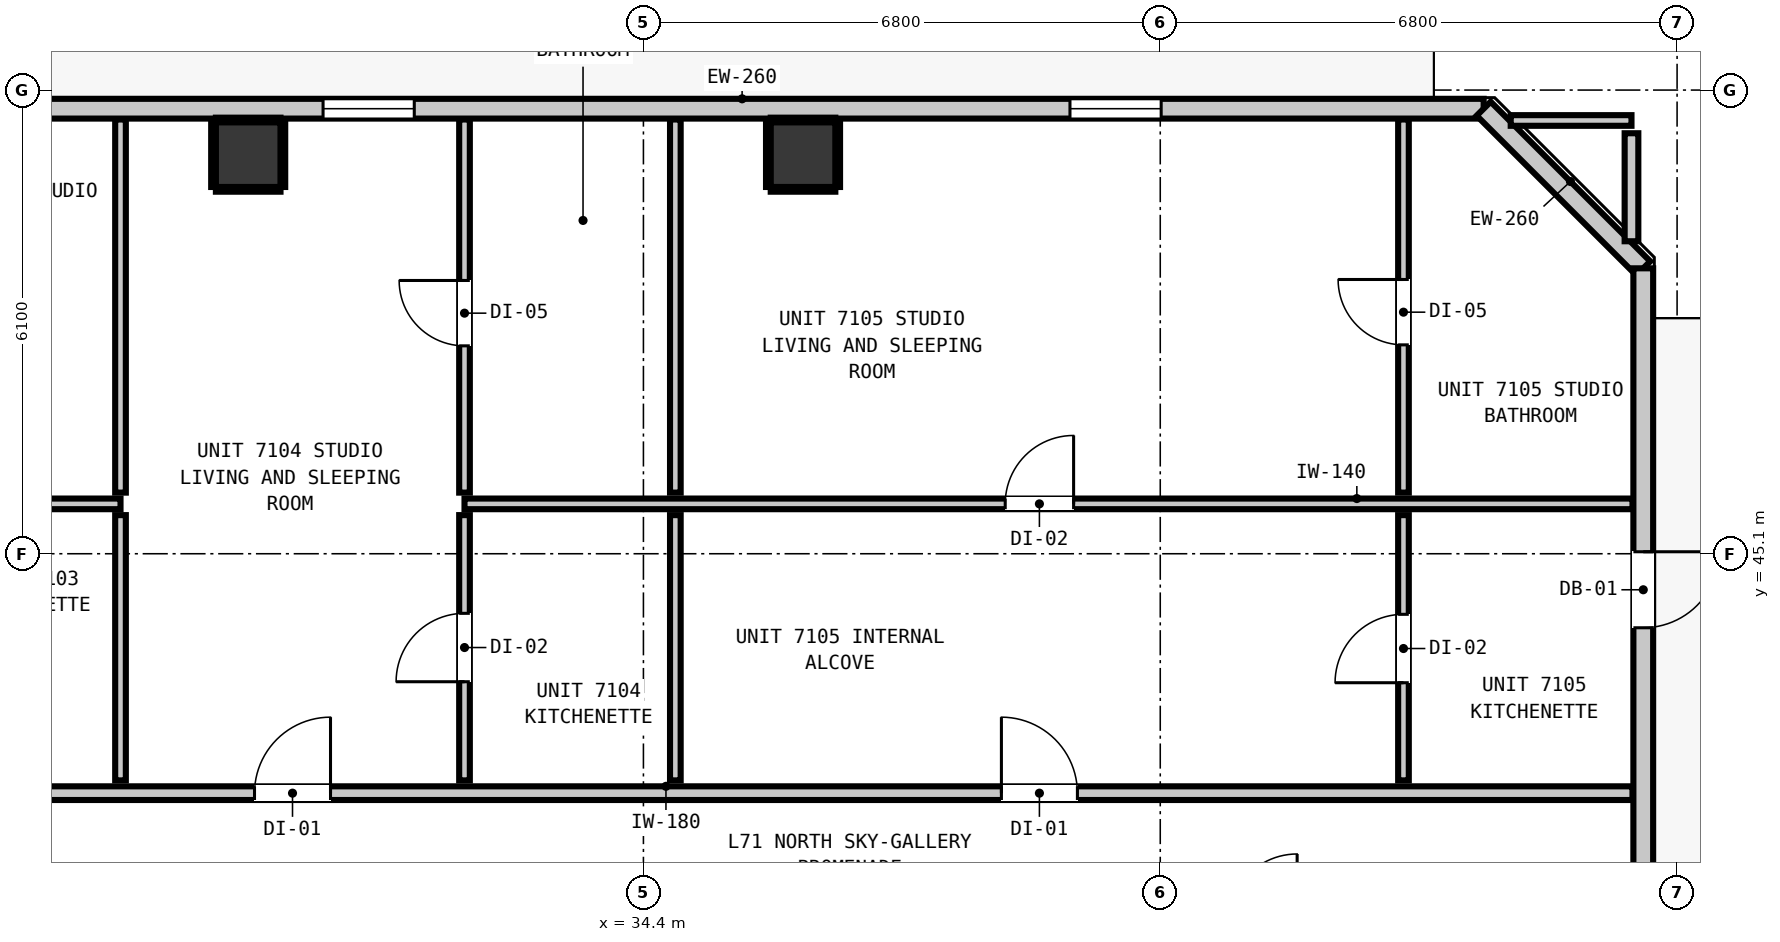
"""IFC4 building model, lengths in metres.
Left out: names, types, materials, properties, quantities, classifications, styles, units other than length and angle.
Written with IfcOpenShell. Run it as: python <this file> out.ifc"""

import sys

from ifc_helpers import new_model, si_unit, direction, frame, frame_2d, origin, origin_2d, place, context, subcontext, project, spatial, rectangle, extrude, element, fill, save


model = new_model("IFC4")
c1 = context("Model", 3, precision=1e-05, world=origin(), true_north=direction((0.0, 1.0)))
c2 = subcontext(c1, "Body", "Model", "MODEL_VIEW")
j1 = project(units=[si_unit("LENGTHUNIT", "METRE"), si_unit("PLANEANGLEUNIT", "RADIAN")], contexts=[c1])
p1 = place(None, origin())
s1 = spatial("IfcSite", under=j1, at=p1, CompositionType="ELEMENT")
p2 = place(p1, origin())
s2 = spatial("IfcBuilding", under=s1, at=p2, CompositionType="ELEMENT")
p3 = place(p2, frame((0.0, 0.0, 244.56)))
s3 = spatial("IfcBuildingStorey", under=s2, at=p3, CompositionType="ELEMENT", Elevation=244.56)
for number, where, z_axis, x_axis in (
    (1, (29.2, 50.35, 0.0), (0.0, 0.0, 1.0), (1.0, 0.0, 0.0)),
    (2, (36.5, 50.35, 0.0), (0.0, 0.0, 1.0), (1.0, 0.0, 0.0)),
):
    element("IfcColumn", number, at=place(p3, frame(where, z_axis=z_axis, x_axis=x_axis)), inside=s3, PredefinedType="COLUMN", context=c2, shape_type="SweptSolid", body=[
        extrude(rectangle(XDim=0.85, YDim=0.85, at=origin_2d()), origin(), (0.0, 0.0, 1.0), 3.32),
    ])
p4 = place(p3, frame((12.745, 50.955, 0.0), z_axis=(0.0, 0.0, 1.0), x_axis=(1.0, 0.0, 0.0)))
e3 = element("IfcWall", 3, at=p4, inside=s3, PredefinedType="STANDARD", context=c2, shape_type="SweptSolid", body=[
    extrude(rectangle(XDim=32.71, YDim=0.26, at=frame_2d((16.355, 0.0))), origin(), (0.0, 0.0, 1.0), 3.1),
])
p5 = place(p4, frame((1.61, 0.0, 0.0)))
e4 = element("IfcOpeningElement", 4, at=p5, cuts=e3, PredefinedType="OPENING", context=c2, shape_type="SweptSolid", body=[
    extrude(rectangle(XDim=1.0, YDim=2.15, at=frame_2d((0.5, 1.075))), frame((0.0, 0.14, 0.0), z_axis=(0.0, -1.0, 0.0), x_axis=(1.0, 0.0, 0.0)), (0.0, 0.0, 1.0), 0.28),
])
p6 = place(p4, frame((9.478, 0.0, 0.85)))
e5 = element("IfcOpeningElement", 5, at=p6, cuts=e3, PredefinedType="OPENING", context=c2, shape_type="SweptSolid", body=[
    extrude(rectangle(XDim=1.2, YDim=1.8, at=frame_2d((0.6, 0.9))), frame((0.0, 0.14, 0.0), z_axis=(0.0, -1.0, 0.0), x_axis=(1.0, 0.0, 0.0)), (0.0, 0.0, 1.0), 0.28),
])
p7 = place(p4, frame((17.44, 0.0, 0.85)))
e6 = element("IfcOpeningElement", 6, at=p7, cuts=e3, PredefinedType="OPENING", context=c2, shape_type="SweptSolid", body=[
    extrude(rectangle(XDim=1.2, YDim=1.8, at=frame_2d((0.6, 0.9))), frame((0.0, 0.14, 0.0), z_axis=(0.0, -1.0, 0.0), x_axis=(1.0, 0.0, 0.0)), (0.0, 0.0, 1.0), 0.28),
])
p8 = place(p4, frame((27.267, 0.0, 0.85)))
e7 = element("IfcOpeningElement", 7, at=p8, cuts=e3, PredefinedType="OPENING", context=c2, shape_type="SweptSolid", body=[
    extrude(rectangle(XDim=1.2, YDim=1.8, at=frame_2d((0.6, 0.9))), frame((0.0, 0.14, 0.0), z_axis=(0.0, -1.0, 0.0), x_axis=(1.0, 0.0, 0.0)), (0.0, 0.0, 1.0), 0.28),
])
p9 = place(p3, frame((45.455, 50.955, 0.0), z_axis=(0.0, 0.0, 1.0), x_axis=(0.707065676302, -0.707147883682, 0.0)))
e8 = element("IfcWall", 8, at=p9, inside=s3, PredefinedType="STANDARD", context=c2, shape_type="SweptSolid", body=[
    extrude(rectangle(XDim=2.97, YDim=0.26, at=frame_2d((1.485, 0.0))), origin(), (0.0, 0.0, 1.0), 3.1),
])
p10 = place(p3, frame((47.555, 48.855, 0.0), z_axis=(0.0, 0.0, 1.0), x_axis=(0.0, -1.0, 0.0)))
e9 = element("IfcWall", 9, at=p10, inside=s3, PredefinedType="STANDARD", context=c2, shape_type="SweptSolid", body=[
    extrude(rectangle(XDim=30.31, YDim=0.26, at=frame_2d((15.155, 0.0))), origin(), (0.0, 0.0, 1.0), 3.1),
])
p11 = place(p10, frame((3.729, 0.0, 0.0)))
e10 = element("IfcOpeningElement", 10, at=p11, cuts=e9, PredefinedType="OPENING", context=c2, shape_type="SweptSolid", body=[
    extrude(rectangle(XDim=1.0, YDim=2.15, at=frame_2d((0.5, 1.075))), frame((0.0, 0.14, 0.0), z_axis=(0.0, -1.0, 0.0), x_axis=(1.0, 0.0, 0.0)), (0.0, 0.0, 1.0), 0.28),
])
p12 = place(p3, frame((10.787, 41.95, 0.0), z_axis=(0.0, 0.0, 1.0), x_axis=(1.0, 0.0, 0.0)))
e11 = element("IfcWall", 11, at=p12, inside=s3, PredefinedType="PARTITIONING", context=c2, shape_type="SweptSolid", body=[
    extrude(rectangle(XDim=36.626, YDim=0.18, at=frame_2d((18.313, 0.0))), origin(), (0.0, 0.0, 1.0), 3.1),
])
p13 = place(p12, frame((2.197, 0.0, 0.0)))
e12 = element("IfcOpeningElement", 12, at=p13, cuts=e11, PredefinedType="OPENING", context=c2, shape_type="SweptSolid", body=[
    extrude(rectangle(XDim=1.0, YDim=2.15, at=frame_2d((0.5, 1.075))), frame((0.0, 0.1, 0.0), z_axis=(0.0, -1.0, 0.0), x_axis=(1.0, 0.0, 0.0)), (0.0, 0.0, 1.0), 0.2),
])
p14 = place(p12, frame((10.533, 0.0, 0.0)))
e13 = element("IfcOpeningElement", 13, at=p14, cuts=e11, PredefinedType="OPENING", context=c2, shape_type="SweptSolid", body=[
    extrude(rectangle(XDim=1.0, YDim=2.15, at=frame_2d((0.5, 1.075))), frame((0.0, 0.1, 0.0), z_axis=(0.0, -1.0, 0.0), x_axis=(1.0, 0.0, 0.0)), (0.0, 0.0, 1.0), 0.2),
])
p15 = place(p12, frame((18.496, 0.0, 0.0)))
e14 = element("IfcOpeningElement", 14, at=p15, cuts=e11, PredefinedType="OPENING", context=c2, shape_type="SweptSolid", body=[
    extrude(rectangle(XDim=1.0, YDim=2.15, at=frame_2d((0.5, 1.075))), frame((0.0, 0.1, 0.0), z_axis=(0.0, -1.0, 0.0), x_axis=(1.0, 0.0, 0.0)), (0.0, 0.0, 1.0), 0.2),
])
p16 = place(p12, frame((28.323, 0.0, 0.0)))
e15 = element("IfcOpeningElement", 15, at=p16, cuts=e11, PredefinedType="OPENING", context=c2, shape_type="SweptSolid", body=[
    extrude(rectangle(XDim=1.0, YDim=2.15, at=frame_2d((0.5, 1.075))), frame((0.0, 0.1, 0.0), z_axis=(0.0, -1.0, 0.0), x_axis=(1.0, 0.0, 0.0)), (0.0, 0.0, 1.0), 0.2),
])
p17 = place(p3, frame((24.52, 45.756, 0.0), z_axis=(0.0, 0.0, 1.0), x_axis=(1.0, 0.0, 0.0)))
e16 = element("IfcWall", 16, at=p17, inside=s3, PredefinedType="PARTITIONING", context=c2, shape_type="SweptSolid", body=[
    extrude(rectangle(XDim=3.0, YDim=0.14, at=frame_2d((1.5, 0.0))), origin(), (0.0, 0.0, 1.0), 3.1),
])
p18 = place(p3, frame((32.046, 45.756, 0.0), z_axis=(0.0, 0.0, 1.0), x_axis=(1.0, 0.0, 0.0)))
e17 = element("IfcWall", 17, at=p18, inside=s3, PredefinedType="PARTITIONING", context=c2, shape_type="SweptSolid", body=[
    extrude(rectangle(XDim=15.367, YDim=0.14, at=frame_2d((7.684, 0.0))), origin(), (0.0, 0.0, 1.0), 3.1),
])
p19 = place(p18, frame((7.114, 0.0, 0.0)))
e18 = element("IfcOpeningElement", 18, at=p19, cuts=e17, PredefinedType="OPENING", context=c2, shape_type="SweptSolid", body=[
    extrude(rectangle(XDim=0.9, YDim=2.1, at=frame_2d((0.45, 1.05))), frame((0.0, 0.08, 0.0), z_axis=(0.0, -1.0, 0.0), x_axis=(1.0, 0.0, 0.0)), (0.0, 0.0, 1.0), 0.16),
])
p20 = place(p3, frame((45.811, 50.8, 0.0), z_axis=(0.0, 0.0, 1.0), x_axis=(1.0, 0.0, 0.0)))
e19 = element("IfcWall", 19, at=p20, inside=s3, PredefinedType="PARTITIONING", context=c2, shape_type="SweptSolid", body=[
    extrude(rectangle(XDim=1.589, YDim=0.14, at=frame_2d((0.794, 0.0))), origin(), (0.0, 0.0, 1.0), 3.1),
])
p21 = place(p3, frame((47.4, 49.211, 0.0), z_axis=(0.0, 0.0, 1.0), x_axis=(0.0, 1.0, 0.0)))
e20 = element("IfcWall", 20, at=p21, inside=s3, PredefinedType="PARTITIONING", context=c2, shape_type="SweptSolid", body=[
    extrude(rectangle(XDim=1.421, YDim=0.18, at=frame_2d((0.71, 0.0))), origin(), (0.0, 0.0, 1.0), 3.1),
])
p22 = place(p3, frame((27.52, 42.118, 0.0), z_axis=(0.0, 0.0, 1.0), x_axis=(0.0, 1.0, 0.0)))
e21 = element("IfcWall", 21, at=p22, inside=s3, PredefinedType="PARTITIONING", context=c2, shape_type="SweptSolid", body=[
    extrude(rectangle(XDim=3.49, YDim=0.14, at=frame_2d((1.745, 0.0))), origin(), (0.0, 0.0, 1.0), 3.1),
])
p23 = place(p3, frame((27.52, 45.904, 0.0), z_axis=(0.0, 0.0, 1.0), x_axis=(0.0, 1.0, 0.0)))
e22 = element("IfcWall", 22, at=p23, inside=s3, PredefinedType="PARTITIONING", context=c2, shape_type="SweptSolid", body=[
    extrude(rectangle(XDim=4.909, YDim=0.14, at=frame_2d((2.455, 0.0))), origin(), (0.0, 0.0, 1.0), 3.1),
])
p24 = place(p3, frame((32.046, 42.118, 0.0), z_axis=(0.0, 0.0, 1.0), x_axis=(0.0, 1.0, 0.0)))
e23 = element("IfcWall", 23, at=p24, inside=s3, PredefinedType="PARTITIONING", context=c2, shape_type="SweptSolid", body=[
    extrude(rectangle(XDim=3.49, YDim=0.14, at=frame_2d((1.745, 0.0))), origin(), (0.0, 0.0, 1.0), 3.1),
])
p25 = place(p24, frame((1.298, 0.0, 0.0)))
e24 = element("IfcOpeningElement", 24, at=p25, cuts=e23, PredefinedType="OPENING", context=c2, shape_type="SweptSolid", body=[
    extrude(rectangle(XDim=0.9, YDim=2.1, at=frame_2d((0.45, 1.05))), frame((0.0, 0.08, 0.0), z_axis=(0.0, -1.0, 0.0), x_axis=(1.0, 0.0, 0.0)), (0.0, 0.0, 1.0), 0.16),
])
p26 = place(p3, frame((32.046, 45.904, 0.0), z_axis=(0.0, 0.0, 1.0), x_axis=(0.0, 1.0, 0.0)))
e25 = element("IfcWall", 25, at=p26, inside=s3, PredefinedType="PARTITIONING", context=c2, shape_type="SweptSolid", body=[
    extrude(rectangle(XDim=4.909, YDim=0.14, at=frame_2d((2.455, 0.0))), origin(), (0.0, 0.0, 1.0), 3.1),
])
p27 = place(p26, frame((1.931, 0.0, 0.0)))
e26 = element("IfcOpeningElement", 26, at=p27, cuts=e25, PredefinedType="OPENING", context=c2, shape_type="SweptSolid", body=[
    extrude(rectangle(XDim=0.86, YDim=2.02, at=frame_2d((0.43, 1.01))), frame((0.0, 0.08, 0.0), z_axis=(0.0, -1.0, 0.0), x_axis=(1.0, 0.0, 0.0)), (0.0, 0.0, 1.0), 0.16),
])
p28 = place(p3, frame((34.82, 42.118, 0.0), z_axis=(0.0, 0.0, 1.0), x_axis=(0.0, 1.0, 0.0)))
e27 = element("IfcWall", 27, at=p28, inside=s3, PredefinedType="PARTITIONING", context=c2, shape_type="SweptSolid", body=[
    extrude(rectangle(XDim=3.49, YDim=0.14, at=frame_2d((1.745, 0.0))), origin(), (0.0, 0.0, 1.0), 3.1),
])
p29 = place(p3, frame((34.82, 45.904, 0.0), z_axis=(0.0, 0.0, 1.0), x_axis=(0.0, 1.0, 0.0)))
e28 = element("IfcWall", 28, at=p29, inside=s3, PredefinedType="PARTITIONING", context=c2, shape_type="SweptSolid", body=[
    extrude(rectangle(XDim=4.909, YDim=0.14, at=frame_2d((2.455, 0.0))), origin(), (0.0, 0.0, 1.0), 3.1),
])
p30 = place(p3, frame((44.4, 42.118, 0.0), z_axis=(0.0, 0.0, 1.0), x_axis=(0.0, 1.0, 0.0)))
e29 = element("IfcWall", 29, at=p30, inside=s3, PredefinedType="PARTITIONING", context=c2, shape_type="SweptSolid", body=[
    extrude(rectangle(XDim=3.49, YDim=0.14, at=frame_2d((1.745, 0.0))), origin(), (0.0, 0.0, 1.0), 3.1),
])
p31 = place(p30, frame((1.285, 0.0, 0.0)))
e30 = element("IfcOpeningElement", 30, at=p31, cuts=e29, PredefinedType="OPENING", context=c2, shape_type="SweptSolid", body=[
    extrude(rectangle(XDim=0.9, YDim=2.1, at=frame_2d((0.45, 1.05))), frame((0.0, 0.08, 0.0), z_axis=(0.0, -1.0, 0.0), x_axis=(1.0, 0.0, 0.0)), (0.0, 0.0, 1.0), 0.16),
])
p32 = place(p3, frame((44.4, 45.904, 0.0), z_axis=(0.0, 0.0, 1.0), x_axis=(0.0, 1.0, 0.0)))
e31 = element("IfcWall", 31, at=p32, inside=s3, PredefinedType="PARTITIONING", context=c2, shape_type="SweptSolid", body=[
    extrude(rectangle(XDim=4.909, YDim=0.14, at=frame_2d((2.455, 0.0))), origin(), (0.0, 0.0, 1.0), 3.1),
])
p33 = place(p32, frame((1.944, 0.0, 0.0)))
e32 = element("IfcOpeningElement", 32, at=p33, cuts=e31, PredefinedType="OPENING", context=c2, shape_type="SweptSolid", body=[
    extrude(rectangle(XDim=0.86, YDim=2.02, at=frame_2d((0.43, 1.01))), frame((0.0, 0.08, 0.0), z_axis=(0.0, -1.0, 0.0), x_axis=(1.0, 0.0, 0.0)), (0.0, 0.0, 1.0), 0.16),
])
for number, where, z_axis, x_axis in (
    (33, (28.775, 49.893, 0.0), (0.0, 0.0, 1.0), (1.0, 0.0, 0.0)),
    (34, (28.775, 50.807, 0.0), (0.0, 0.0, 1.0), (1.0, 0.0, 0.0)),
):
    element("IfcWall", number, at=place(p3, frame(where, z_axis=z_axis, x_axis=x_axis)), inside=s3, PredefinedType="PARTITIONING", context=c2, shape_type="SweptSolid", body=[
        extrude(rectangle(XDim=0.85, YDim=0.06, at=frame_2d((0.425, 0.0))), origin(), (0.0, 0.0, 1.0), 1.45),
    ])
for number, where, z_axis, x_axis in (
    (35, (28.743, 49.925, 0.0), (0.0, 0.0, 1.0), (0.0, 1.0, 0.0)),
    (36, (29.657, 49.925, 0.0), (0.0, 0.0, 1.0), (0.0, 1.0, 0.0)),
):
    element("IfcWall", number, at=place(p3, frame(where, z_axis=z_axis, x_axis=x_axis)), inside=s3, PredefinedType="PARTITIONING", context=c2, shape_type="SweptSolid", body=[
        extrude(rectangle(XDim=0.85, YDim=0.06, at=frame_2d((0.425, 0.0))), origin(), (0.0, 0.0, 1.0), 1.45),
    ])
for number, where, z_axis, x_axis in (
    (37, (36.075, 49.893, 0.0), (0.0, 0.0, 1.0), (1.0, 0.0, 0.0)),
    (38, (36.075, 50.807, 0.0), (0.0, 0.0, 1.0), (1.0, 0.0, 0.0)),
):
    element("IfcWall", number, at=place(p3, frame(where, z_axis=z_axis, x_axis=x_axis)), inside=s3, PredefinedType="PARTITIONING", context=c2, shape_type="SweptSolid", body=[
        extrude(rectangle(XDim=0.85, YDim=0.06, at=frame_2d((0.425, 0.0))), origin(), (0.0, 0.0, 1.0), 1.45),
    ])
for number, where, z_axis, x_axis in (
    (39, (36.043, 49.925, 0.0), (0.0, 0.0, 1.0), (0.0, 1.0, 0.0)),
    (40, (36.957, 49.925, 0.0), (0.0, 0.0, 1.0), (0.0, 1.0, 0.0)),
):
    element("IfcWall", number, at=place(p3, frame(where, z_axis=z_axis, x_axis=x_axis)), inside=s3, PredefinedType="PARTITIONING", context=c2, shape_type="SweptSolid", body=[
        extrude(rectangle(XDim=0.85, YDim=0.06, at=frame_2d((0.425, 0.0))), origin(), (0.0, 0.0, 1.0), 1.45),
    ])
p34 = place(p11, origin())
e41 = element("IfcDoor", 41, at=p34, inside=s3, OperationType="SINGLE_SWING_LEFT", PredefinedType="DOOR", context=c2, shape_type="SweptSolid", body=[
    extrude(rectangle(XDim=1.0, YDim=2.15, at=frame_2d((0.5, 1.075))), frame((0.0, 0.025, 0.0), z_axis=(0.0, -1.0, 0.0), x_axis=(1.0, 0.0, 0.0)), (0.0, 0.0, 1.0), 0.05),
])
fill(e10, e41)
p35 = place(p7, origin())
e42 = element("IfcWindow", 42, at=p35, inside=s3, PartitioningType="SINGLE_PANEL", PredefinedType="WINDOW", context=c2, shape_type="SweptSolid", body=[
    extrude(rectangle(XDim=1.2, YDim=1.8, at=frame_2d((0.6, 0.9))), frame((0.0, 0.03, 0.0), z_axis=(0.0, -1.0, 0.0), x_axis=(1.0, 0.0, 0.0)), (0.0, 0.0, 1.0), 0.06),
])
fill(e6, e42)
p36 = place(p8, origin())
e43 = element("IfcWindow", 43, at=p36, inside=s3, PartitioningType="SINGLE_PANEL", PredefinedType="WINDOW", context=c2, shape_type="SweptSolid", body=[
    extrude(rectangle(XDim=1.2, YDim=1.8, at=frame_2d((0.6, 0.9))), frame((0.0, 0.03, 0.0), z_axis=(0.0, -1.0, 0.0), x_axis=(1.0, 0.0, 0.0)), (0.0, 0.0, 1.0), 0.06),
])
fill(e7, e43)
p37 = place(p15, origin())
e44 = element("IfcDoor", 44, at=p37, inside=s3, OperationType="SINGLE_SWING_RIGHT", PredefinedType="DOOR", context=c2, shape_type="SweptSolid", body=[
    extrude(rectangle(XDim=1.0, YDim=2.15, at=frame_2d((0.5, 1.075))), frame((0.0, 0.025, 0.0), z_axis=(0.0, -1.0, 0.0), x_axis=(1.0, 0.0, 0.0)), (0.0, 0.0, 1.0), 0.05),
])
fill(e14, e44)
p38 = place(p25, origin())
e45 = element("IfcDoor", 45, at=p38, inside=s3, OperationType="SINGLE_SWING_LEFT", PredefinedType="DOOR", context=c2, shape_type="SweptSolid", body=[
    extrude(rectangle(XDim=0.9, YDim=2.1, at=frame_2d((0.45, 1.05))), frame((0.0, 0.025, 0.0), z_axis=(0.0, -1.0, 0.0), x_axis=(1.0, 0.0, 0.0)), (0.0, 0.0, 1.0), 0.05),
])
fill(e24, e45)
p39 = place(p27, origin())
e46 = element("IfcDoor", 46, at=p39, inside=s3, OperationType="SINGLE_SWING_RIGHT", PredefinedType="DOOR", context=c2, shape_type="SweptSolid", body=[
    extrude(rectangle(XDim=0.86, YDim=2.02, at=frame_2d((0.43, 1.01))), frame((0.0, 0.025, 0.0), z_axis=(0.0, -1.0, 0.0), x_axis=(1.0, 0.0, 0.0)), (0.0, 0.0, 1.0), 0.05),
])
fill(e26, e46)
p40 = place(p16, origin())
e47 = element("IfcDoor", 47, at=p40, inside=s3, OperationType="SINGLE_SWING_LEFT", PredefinedType="DOOR", context=c2, shape_type="SweptSolid", body=[
    extrude(rectangle(XDim=1.0, YDim=2.15, at=frame_2d((0.5, 1.075))), frame((0.0, 0.025, 0.0), z_axis=(0.0, -1.0, 0.0), x_axis=(1.0, 0.0, 0.0)), (0.0, 0.0, 1.0), 0.05),
])
fill(e15, e47)
p41 = place(p19, origin())
e48 = element("IfcDoor", 48, at=p41, inside=s3, OperationType="SINGLE_SWING_RIGHT", PredefinedType="DOOR", context=c2, shape_type="SweptSolid", body=[
    extrude(rectangle(XDim=0.9, YDim=2.1, at=frame_2d((0.45, 1.05))), frame((0.0, 0.025, 0.0), z_axis=(0.0, -1.0, 0.0), x_axis=(1.0, 0.0, 0.0)), (0.0, 0.0, 1.0), 0.05),
])
fill(e18, e48)
p42 = place(p31, origin())
e49 = element("IfcDoor", 49, at=p42, inside=s3, OperationType="SINGLE_SWING_LEFT", PredefinedType="DOOR", context=c2, shape_type="SweptSolid", body=[
    extrude(rectangle(XDim=0.9, YDim=2.1, at=frame_2d((0.45, 1.05))), frame((0.0, 0.025, 0.0), z_axis=(0.0, -1.0, 0.0), x_axis=(1.0, 0.0, 0.0)), (0.0, 0.0, 1.0), 0.05),
])
fill(e30, e49)
p43 = place(p33, origin())
e50 = element("IfcDoor", 50, at=p43, inside=s3, OperationType="SINGLE_SWING_RIGHT", PredefinedType="DOOR", context=c2, shape_type="SweptSolid", body=[
    extrude(rectangle(XDim=0.86, YDim=2.02, at=frame_2d((0.43, 1.01))), frame((0.0, 0.025, 0.0), z_axis=(0.0, -1.0, 0.0), x_axis=(1.0, 0.0, 0.0)), (0.0, 0.0, 1.0), 0.05),
])
fill(e32, e50)
save(model, sys.argv[1])
